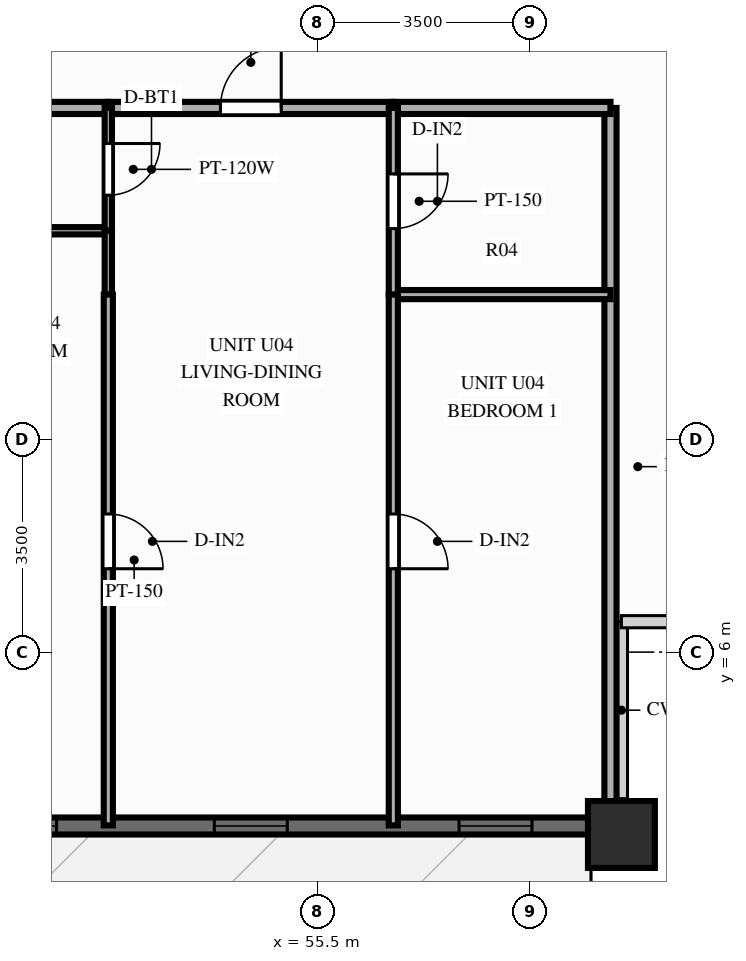
"""IFC4 building model, lengths in metres.
Left out: names, types, materials, properties, quantities, classifications, styles, units other than length and angle.
Written with IfcOpenShell. Run it as: python <this file> out.ifc"""

import sys

from ifc_helpers import new_model, si_unit, direction, frame, frame_2d, origin, origin_2d, place, context, subcontext, project, spatial, rectangle, extrude, source, transform, mapped, element, fill, save


model = new_model("IFC4")
c1 = context("Model", 3, precision=1e-05, world=origin(), true_north=direction((0.0, 1.0)))
c2 = subcontext(c1, "Body", "Model", "MODEL_VIEW")
j1 = project(units=[si_unit("LENGTHUNIT", "METRE"), si_unit("PLANEANGLEUNIT", "RADIAN")], contexts=[c1])
p1 = place(None, origin())
s1 = spatial("IfcSite", under=j1, at=p1, CompositionType="ELEMENT")
p2 = place(p1, origin())
s2 = spatial("IfcBuilding", under=s1, at=p2, CompositionType="ELEMENT")
p3 = place(p2, frame((0.0, 0.0, 43.4)))
s3 = spatial("IfcBuildingStorey", under=s2, at=p3, CompositionType="ELEMENT", Elevation=43.4)
m1 = source(origin(), c2, "Body", "SweptSolid", [
    extrude(rectangle(XDim=1.1, YDim=1.1, at=origin_2d()), origin(), (0.0, 0.0, 1.0), 3.0),
])
p4 = place(p3, frame((60.5, 3.0, 0.0), z_axis=(0.0, 0.0, 1.0), x_axis=(1.0, 0.0, 0.0)))
e1 = element("IfcColumn", 1, at=p4, inside=s3, PredefinedType="COLUMN", context=c2, shape_type="MappedRepresentation", body=[
    mapped(m1, transform((0.0, 0.0, 0.0), scale=1.0)),
])
p5 = place(p3, frame((15.5, 3.14, 0.0), z_axis=(0.0, 0.0, 1.0), x_axis=(1.0, 0.0, 0.0)))
e2 = element("IfcWall", 2, at=p5, inside=s3, PredefinedType="SOLIDWALL", context=c2, shape_type="SweptSolid", body=[
    extrude(rectangle(XDim=45.0, YDim=0.28, at=frame_2d((22.5, 0.0))), origin(), (0.0, 0.0, 1.0), 2.28),
])
p6 = place(p5, frame((1.136, 0.0, 0.25)))
e3 = element("IfcOpeningElement", 3, at=p6, cuts=e2, PredefinedType="OPENING", context=c2, shape_type="SweptSolid", body=[
    extrude(rectangle(XDim=1.2, YDim=1.5, at=frame_2d((0.6, 0.75))), frame((0.0, 0.152, 0.0), z_axis=(0.0, -1.0, 0.0), x_axis=(1.0, 0.0, 0.0)), (0.0, 0.0, 1.0), 0.304),
])
p7 = place(p5, frame((4.825, 0.0, 0.25)))
e4 = element("IfcOpeningElement", 4, at=p7, cuts=e2, PredefinedType="OPENING", context=c2, shape_type="SweptSolid", body=[
    extrude(rectangle(XDim=1.2, YDim=1.5, at=frame_2d((0.6, 0.75))), frame((0.0, 0.152, 0.0), z_axis=(0.0, -1.0, 0.0), x_axis=(1.0, 0.0, 0.0)), (0.0, 0.0, 1.0), 0.304),
])
p8 = place(p5, frame((8.954, 0.0, 0.25)))
e5 = element("IfcOpeningElement", 5, at=p8, cuts=e2, PredefinedType="OPENING", context=c2, shape_type="SweptSolid", body=[
    extrude(rectangle(XDim=1.2, YDim=1.5, at=frame_2d((0.6, 0.75))), frame((0.0, 0.152, 0.0), z_axis=(0.0, -1.0, 0.0), x_axis=(1.0, 0.0, 0.0)), (0.0, 0.0, 1.0), 0.304),
])
p9 = place(p5, frame((12.191, 0.0, 0.25)))
e6 = element("IfcOpeningElement", 6, at=p9, cuts=e2, PredefinedType="OPENING", context=c2, shape_type="SweptSolid", body=[
    extrude(rectangle(XDim=1.2, YDim=1.5, at=frame_2d((0.6, 0.75))), frame((0.0, 0.152, 0.0), z_axis=(0.0, -1.0, 0.0), x_axis=(1.0, 0.0, 0.0)), (0.0, 0.0, 1.0), 0.304),
])
p10 = place(p5, frame((14.576, 0.0, 0.25)))
e7 = element("IfcOpeningElement", 7, at=p10, cuts=e2, PredefinedType="OPENING", context=c2, shape_type="SweptSolid", body=[
    extrude(rectangle(XDim=0.7, YDim=1.5, at=frame_2d((0.35, 0.75))), frame((0.0, 0.152, 0.0), z_axis=(0.0, -1.0, 0.0), x_axis=(1.0, 0.0, 0.0)), (0.0, 0.0, 1.0), 0.304),
])
p11 = place(p5, frame((17.059, 0.0, 0.25)))
e8 = element("IfcOpeningElement", 8, at=p11, cuts=e2, PredefinedType="OPENING", context=c2, shape_type="SweptSolid", body=[
    extrude(rectangle(XDim=1.2, YDim=1.5, at=frame_2d((0.6, 0.75))), frame((0.0, 0.152, 0.0), z_axis=(0.0, -1.0, 0.0), x_axis=(1.0, 0.0, 0.0)), (0.0, 0.0, 1.0), 0.304),
])
p12 = place(p5, frame((21.264, 0.0, 0.0), z_axis=(0.0, 0.0, 1.0), x_axis=(-1.0, 0.0, 0.0)))
e9 = element("IfcOpeningElement", 9, at=p12, cuts=e2, PredefinedType="OPENING", context=c2, shape_type="SweptSolid", body=[
    extrude(rectangle(XDim=1.1, YDim=2.15, at=frame_2d((0.55, 1.075))), frame((0.0, 0.152, 0.0), z_axis=(0.0, -1.0, 0.0), x_axis=(1.0, 0.0, 0.0)), (0.0, 0.0, 1.0), 0.304),
])
p13 = place(p5, frame((23.351, 0.0, 0.25)))
e10 = element("IfcOpeningElement", 10, at=p13, cuts=e2, PredefinedType="OPENING", context=c2, shape_type="SweptSolid", body=[
    extrude(rectangle(XDim=1.2, YDim=1.5, at=frame_2d((0.6, 0.75))), frame((0.0, 0.152, 0.0), z_axis=(0.0, -1.0, 0.0), x_axis=(1.0, 0.0, 0.0)), (0.0, 0.0, 1.0), 0.304),
])
p14 = place(p5, frame((26.406, 0.0, 0.25)))
e11 = element("IfcOpeningElement", 11, at=p14, cuts=e2, PredefinedType="OPENING", context=c2, shape_type="SweptSolid", body=[
    extrude(rectangle(XDim=1.2, YDim=1.5, at=frame_2d((0.6, 0.75))), frame((0.0, 0.152, 0.0), z_axis=(0.0, -1.0, 0.0), x_axis=(1.0, 0.0, 0.0)), (0.0, 0.0, 1.0), 0.304),
])
p15 = place(p5, frame((31.39, 0.0, 0.25)))
e12 = element("IfcOpeningElement", 12, at=p15, cuts=e2, PredefinedType="OPENING", context=c2, shape_type="SweptSolid", body=[
    extrude(rectangle(XDim=1.2, YDim=1.5, at=frame_2d((0.6, 0.75))), frame((0.0, 0.152, 0.0), z_axis=(0.0, -1.0, 0.0), x_axis=(1.0, 0.0, 0.0)), (0.0, 0.0, 1.0), 0.304),
])
p16 = place(p5, frame((34.511, 0.0, 0.25)))
e13 = element("IfcOpeningElement", 13, at=p16, cuts=e2, PredefinedType="OPENING", context=c2, shape_type="SweptSolid", body=[
    extrude(rectangle(XDim=1.2, YDim=1.5, at=frame_2d((0.6, 0.75))), frame((0.0, 0.152, 0.0), z_axis=(0.0, -1.0, 0.0), x_axis=(1.0, 0.0, 0.0)), (0.0, 0.0, 1.0), 0.304),
])
p17 = place(p5, frame((38.305, 0.0, 0.25)))
e14 = element("IfcOpeningElement", 14, at=p17, cuts=e2, PredefinedType="OPENING", context=c2, shape_type="SweptSolid", body=[
    extrude(rectangle(XDim=1.2, YDim=1.5, at=frame_2d((0.6, 0.75))), frame((0.0, 0.152, 0.0), z_axis=(0.0, -1.0, 0.0), x_axis=(1.0, 0.0, 0.0)), (0.0, 0.0, 1.0), 0.304),
])
p18 = place(p5, frame((42.329, 0.0, 0.25)))
e15 = element("IfcOpeningElement", 15, at=p18, cuts=e2, PredefinedType="OPENING", context=c2, shape_type="SweptSolid", body=[
    extrude(rectangle(XDim=1.2, YDim=1.5, at=frame_2d((0.6, 0.75))), frame((0.0, 0.152, 0.0), z_axis=(0.0, -1.0, 0.0), x_axis=(1.0, 0.0, 0.0)), (0.0, 0.0, 1.0), 0.304),
])
p19 = place(p3, frame((60.32, 14.95, 0.0), z_axis=(0.0, 0.0, 1.0), x_axis=(0.0, -1.0, 0.0)))
e16 = element("IfcWall", 16, at=p19, inside=s3, PredefinedType="PARTITIONING", context=c2, shape_type="SweptSolid", body=[
    extrude(rectangle(XDim=11.8, YDim=0.2, at=frame_2d((5.9, 0.0))), origin(), (0.0, 0.0, 1.0), 2.79),
])
p20 = place(p3, frame((49.16, 14.95, 0.0), z_axis=(0.0, 0.0, 1.0), x_axis=(1.0, 0.0, 0.0)))
e17 = element("IfcWall", 17, at=p20, inside=s3, PredefinedType="PARTITIONING", context=c2, shape_type="SweptSolid", body=[
    extrude(rectangle(XDim=2.902, YDim=0.2, at=frame_2d((1.451, 0.0))), origin(), (0.0, 0.0, 1.0), 2.79),
])
p21 = place(p3, frame((52.062, 14.95, 0.0), z_axis=(0.0, 0.0, 1.0), x_axis=(1.0, 0.0, 0.0)))
e18 = element("IfcWall", 18, at=p21, inside=s3, PredefinedType="PARTITIONING", context=c2, shape_type="SweptSolid", body=[
    extrude(rectangle(XDim=4.687, YDim=0.2, at=frame_2d((2.344, 0.0))), origin(), (0.0, 0.0, 1.0), 2.79),
])
p22 = place(p21, frame((1.844, 0.0, 0.0)))
e19 = element("IfcOpeningElement", 19, at=p22, cuts=e18, PredefinedType="OPENING", context=c2, shape_type="SweptSolid", body=[
    extrude(rectangle(XDim=1.0, YDim=2.15, at=frame_2d((0.5, 1.075))), frame((0.0, 0.112, 0.0), z_axis=(0.0, -1.0, 0.0), x_axis=(1.0, 0.0, 0.0)), (0.0, 0.0, 1.0), 0.224),
])
p23 = place(p3, frame((56.749, 14.95, 0.0), z_axis=(0.0, 0.0, 1.0), x_axis=(1.0, 0.0, 0.0)))
e20 = element("IfcWall", 20, at=p23, inside=s3, PredefinedType="PARTITIONING", context=c2, shape_type="SweptSolid", body=[
    extrude(rectangle(XDim=3.571, YDim=0.2, at=frame_2d((1.786, 0.0))), origin(), (0.0, 0.0, 1.0), 2.79),
])
p24 = place(p3, frame((49.16, 12.93, 0.0), z_axis=(0.0, 0.0, 1.0), x_axis=(1.0, 0.0, 0.0)))
e21 = element("IfcWall", 21, at=p24, inside=s3, PredefinedType="PARTITIONING", context=c2, shape_type="SweptSolid", body=[
    extrude(rectangle(XDim=2.902, YDim=0.12, at=frame_2d((1.451, 0.0))), origin(), (0.0, 0.0, 1.0), 2.79),
])
p25 = place(p3, frame((56.749, 11.88, 0.0), z_axis=(0.0, 0.0, 1.0), x_axis=(1.0, 0.0, 0.0)))
e22 = element("IfcWall", 22, at=p25, inside=s3, PredefinedType="PARTITIONING", context=c2, shape_type="SweptSolid", body=[
    extrude(rectangle(XDim=3.571, YDim=0.15, at=frame_2d((1.786, 0.0))), origin(), (0.0, 0.0, 1.0), 2.79),
])
p26 = place(p3, frame((52.062, 14.95, 0.0), z_axis=(0.0, 0.0, 1.0), x_axis=(0.0, -1.0, 0.0)))
e23 = element("IfcWall", 23, at=p26, inside=s3, PredefinedType="PARTITIONING", context=c2, shape_type="SweptSolid", body=[
    extrude(rectangle(XDim=2.02, YDim=0.12, at=frame_2d((1.01, 0.0))), origin(), (0.0, 0.0, 1.0), 2.79),
])
p27 = place(p26, frame((0.585, 0.0, 0.0)))
e24 = element("IfcOpeningElement", 24, at=p27, cuts=e23, PredefinedType="OPENING", context=c2, shape_type="SweptSolid", body=[
    extrude(rectangle(XDim=0.85, YDim=2.05, at=frame_2d((0.425, 1.025))), frame((0.0, 0.072, 0.0), z_axis=(0.0, -1.0, 0.0), x_axis=(1.0, 0.0, 0.0)), (0.0, 0.0, 1.0), 0.144),
])
p28 = place(p3, frame((52.062, 12.93, 0.0), z_axis=(0.0, 0.0, 1.0), x_axis=(0.0, -1.0, 0.0)))
e25 = element("IfcWall", 25, at=p28, inside=s3, PredefinedType="PARTITIONING", context=c2, shape_type="SweptSolid", body=[
    extrude(rectangle(XDim=1.05, YDim=0.12, at=frame_2d((0.525, 0.0))), origin(), (0.0, 0.0, 1.0), 2.79),
])
p29 = place(p3, frame((52.062, 11.88, 0.0), z_axis=(0.0, 0.0, 1.0), x_axis=(0.0, -1.0, 0.0)))
e26 = element("IfcWall", 26, at=p29, inside=s3, PredefinedType="PARTITIONING", context=c2, shape_type="SweptSolid", body=[
    extrude(rectangle(XDim=8.73, YDim=0.15, at=frame_2d((4.365, 0.0))), origin(), (0.0, 0.0, 1.0), 2.79),
])
p30 = place(p29, frame((3.609, 0.0, 0.0)))
e27 = element("IfcOpeningElement", 27, at=p30, cuts=e26, PredefinedType="OPENING", context=c2, shape_type="SweptSolid", body=[
    extrude(rectangle(XDim=0.9, YDim=2.1, at=frame_2d((0.45, 1.05))), frame((0.0, 0.087, 0.0), z_axis=(0.0, -1.0, 0.0), x_axis=(1.0, 0.0, 0.0)), (0.0, 0.0, 1.0), 0.174),
])
p31 = place(p3, frame((56.749, 14.95, 0.0), z_axis=(0.0, 0.0, 1.0), x_axis=(0.0, -1.0, 0.0)))
e28 = element("IfcWall", 28, at=p31, inside=s3, PredefinedType="PARTITIONING", context=c2, shape_type="SweptSolid", body=[
    extrude(rectangle(XDim=3.07, YDim=0.15, at=frame_2d((1.535, 0.0))), origin(), (0.0, 0.0, 1.0), 2.79),
])
p32 = place(p31, frame((1.085, 0.0, 0.0)))
e29 = element("IfcOpeningElement", 29, at=p32, cuts=e28, PredefinedType="OPENING", context=c2, shape_type="SweptSolid", body=[
    extrude(rectangle(XDim=0.9, YDim=2.1, at=frame_2d((0.45, 1.05))), frame((0.0, 0.087, 0.0), z_axis=(0.0, -1.0, 0.0), x_axis=(1.0, 0.0, 0.0)), (0.0, 0.0, 1.0), 0.174),
])
p33 = place(p3, frame((56.749, 11.88, 0.0), z_axis=(0.0, 0.0, 1.0), x_axis=(0.0, -1.0, 0.0)))
e30 = element("IfcWall", 30, at=p33, inside=s3, PredefinedType="PARTITIONING", context=c2, shape_type="SweptSolid", body=[
    extrude(rectangle(XDim=8.73, YDim=0.15, at=frame_2d((4.365, 0.0))), origin(), (0.0, 0.0, 1.0), 2.79),
])
p34 = place(p33, frame((3.609, 0.0, 0.0)))
e31 = element("IfcOpeningElement", 31, at=p34, cuts=e30, PredefinedType="OPENING", context=c2, shape_type="SweptSolid", body=[
    extrude(rectangle(XDim=0.9, YDim=2.1, at=frame_2d((0.45, 1.05))), frame((0.0, 0.087, 0.0), z_axis=(0.0, -1.0, 0.0), x_axis=(1.0, 0.0, 0.0)), (0.0, 0.0, 1.0), 0.174),
])
m2 = source(origin(), c2, "Body", "SweptSolid", [
    extrude(rectangle(XDim=1.2, YDim=1.5, at=frame_2d((0.6, 0.75))), frame((0.0, 0.03, 0.0), z_axis=(0.0, -1.0, 0.0), x_axis=(1.0, 0.0, 0.0)), (0.0, 0.0, 1.0), 0.06),
])
p35 = place(p16, origin())
e32 = element("IfcWindow", 32, at=p35, inside=s3, PartitioningType="SINGLE_PANEL", PredefinedType="WINDOW", context=c2, shape_type="MappedRepresentation", body=[
    mapped(m2, transform((0.0, 0.0, 0.0), scale=1.0)),
])
fill(e13, e32)
p36 = place(p17, origin())
e33 = element("IfcWindow", 33, at=p36, inside=s3, PartitioningType="SINGLE_PANEL", PredefinedType="WINDOW", context=c2, shape_type="MappedRepresentation", body=[
    mapped(m2, transform((0.0, 0.0, 0.0), scale=1.0)),
])
fill(e14, e33)
p37 = place(p18, origin())
e34 = element("IfcWindow", 34, at=p37, inside=s3, PartitioningType="SINGLE_PANEL", PredefinedType="WINDOW", context=c2, shape_type="MappedRepresentation", body=[
    mapped(m2, transform((0.0, 0.0, 0.0), scale=1.0)),
])
fill(e15, e34)
m3 = source(origin(), c2, "Body", "SweptSolid", [
    extrude(rectangle(XDim=1.0, YDim=2.15, at=frame_2d((0.5, 1.075))), frame((0.0, 0.025, 0.0), z_axis=(0.0, -1.0, 0.0), x_axis=(1.0, 0.0, 0.0)), (0.0, 0.0, 1.0), 0.05),
])
p38 = place(p22, origin())
e35 = element("IfcDoor", 35, at=p38, inside=s3, OperationType="SINGLE_SWING_RIGHT", PredefinedType="DOOR", context=c2, shape_type="MappedRepresentation", body=[
    mapped(m3, transform((0.0, 0.0, 0.0), scale=1.0)),
])
fill(e19, e35)
m4 = source(origin(), c2, "Body", "SweptSolid", [
    extrude(rectangle(XDim=0.85, YDim=2.05, at=frame_2d((0.425, 1.025))), frame((0.0, 0.025, 0.0), z_axis=(0.0, -1.0, 0.0), x_axis=(1.0, 0.0, 0.0)), (0.0, 0.0, 1.0), 0.05),
])
p39 = place(p27, origin())
e36 = element("IfcDoor", 36, at=p39, inside=s3, OperationType="SINGLE_SWING_LEFT", PredefinedType="DOOR", context=c2, shape_type="MappedRepresentation", body=[
    mapped(m4, transform((0.0, 0.0, 0.0), scale=1.0)),
])
fill(e24, e36)
m5 = source(origin(), c2, "Body", "SweptSolid", [
    extrude(rectangle(XDim=0.9, YDim=2.1, at=frame_2d((0.45, 1.05))), frame((0.0, 0.025, 0.0), z_axis=(0.0, -1.0, 0.0), x_axis=(1.0, 0.0, 0.0)), (0.0, 0.0, 1.0), 0.05),
])
p40 = place(p30, origin())
e37 = element("IfcDoor", 37, at=p40, inside=s3, OperationType="SINGLE_SWING_RIGHT", PredefinedType="DOOR", context=c2, shape_type="MappedRepresentation", body=[
    mapped(m5, transform((0.0, 0.0, 0.0), scale=1.0)),
])
fill(e27, e37)
p41 = place(p32, origin())
e38 = element("IfcDoor", 38, at=p41, inside=s3, OperationType="SINGLE_SWING_LEFT", PredefinedType="DOOR", context=c2, shape_type="MappedRepresentation", body=[
    mapped(m5, transform((0.0, 0.0, 0.0), scale=1.0)),
])
fill(e29, e38)
p42 = place(p34, origin())
e39 = element("IfcDoor", 39, at=p42, inside=s3, OperationType="SINGLE_SWING_RIGHT", PredefinedType="DOOR", context=c2, shape_type="MappedRepresentation", body=[
    mapped(m5, transform((0.0, 0.0, 0.0), scale=1.0)),
])
fill(e31, e39)
save(model, sys.argv[1])
